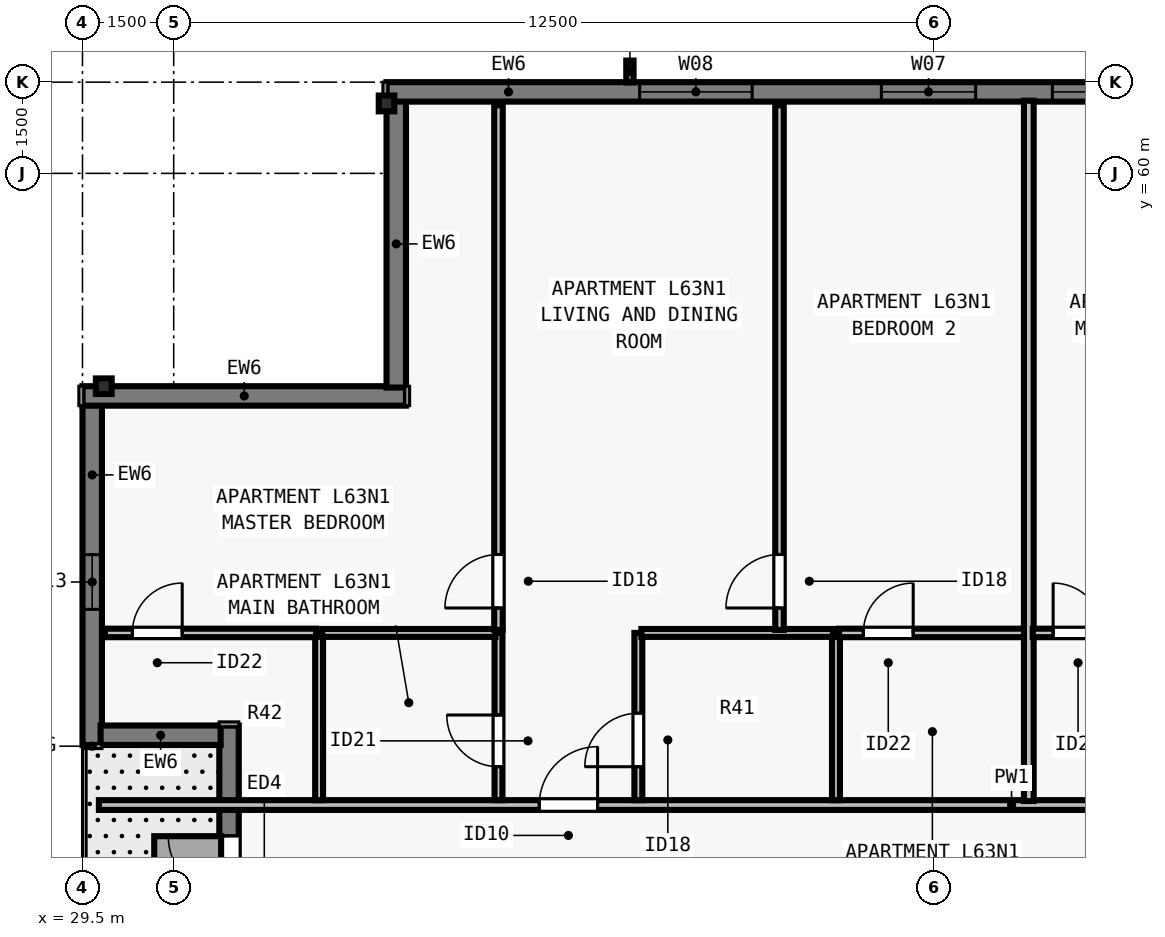
"""IFC4 building model, lengths in metres.
Left out: names, types, materials, properties, quantities, classifications, styles, units other than length and angle.
Written with IfcOpenShell. Run it as: python <this file> out.ifc"""

import sys

from ifc_helpers import new_model, si_unit, direction, frame, frame_2d, origin, origin_2d, place, context, subcontext, project, spatial, rectangle, i_section, extrude, element, fill, save


model = new_model("IFC4")
c1 = context("Model", 3, precision=1e-05, world=origin(), true_north=direction((0.0, 1.0)))
c2 = subcontext(c1, "Body", "Model", "MODEL_VIEW")
j1 = project(units=[si_unit("LENGTHUNIT", "METRE"), si_unit("PLANEANGLEUNIT", "RADIAN")], contexts=[c1])
p1 = place(None, origin())
s1 = spatial("IfcSite", under=j1, at=p1, CompositionType="ELEMENT")
p2 = place(p1, origin())
s2 = spatial("IfcBuilding", under=s1, at=p2, CompositionType="ELEMENT")
p3 = place(p2, frame((0.0, 0.0, 230.5)))
s3 = spatial("IfcBuildingStorey", under=s2, at=p3, CompositionType="ELEMENT", Elevation=230.5)
for number, where, z_axis, x_axis in (
    (1, (34.5, 61.15, 0.0), (0.0, 0.0, 1.0), (1.0, 0.0, 0.0)),
    (2, (29.85, 56.5, 0.0), (0.0, 0.0, 1.0), (0.0, 1.0, 0.0)),
):
    element("IfcColumn", number, at=place(p3, frame(where, z_axis=z_axis, x_axis=x_axis)), inside=s3, PredefinedType="COLUMN", context=c2, shape_type="SweptSolid", body=[
        extrude(i_section(OverallWidth=0.256, OverallDepth=0.26, WebThickness=0.01, FlangeThickness=0.017, FilletRadius=0.013, at=origin_2d()), origin(), (0.0, 0.0, 1.0), 3.5),
    ])
p4 = place(p3, frame((29.66, 50.6, 0.0), z_axis=(0.0, 0.0, 1.0), x_axis=(0.0, 1.0, 0.0)))
e3 = element("IfcWall", 3, at=p4, inside=s3, PredefinedType="SOLIDWALL", context=c2, shape_type="SweptSolid", body=[
    extrude(rectangle(XDim=5.602, YDim=0.32, at=frame_2d((2.801, 0.0))), origin(), (0.0, 0.0, 1.0), 3.29),
])
p5 = place(p4, frame((2.23, 0.0, 0.8)))
e4 = element("IfcOpeningElement", 4, at=p5, cuts=e3, PredefinedType="OPENING", context=c2, shape_type="SweptSolid", body=[
    extrude(rectangle(XDim=0.9, YDim=1.678, at=frame_2d((0.45, 0.839))), frame((0.0, 0.17, 0.0), z_axis=(0.0, -1.0, 0.0), x_axis=(1.0, 0.0, 0.0)), (0.0, 0.0, 1.0), 0.34),
])
p6 = place(p3, frame((29.5, 56.34, 0.0), z_axis=(0.0, 0.0, 1.0), x_axis=(1.0, 0.0, 0.0)))
e5 = element("IfcWall", 5, at=p6, inside=s3, PredefinedType="SOLIDWALL", context=c2, shape_type="SweptSolid", body=[
    extrude(rectangle(XDim=5.32, YDim=0.32, at=frame_2d((2.66, 0.0))), origin(), (0.0, 0.0, 1.0), 3.29),
])
p7 = place(p3, frame((34.66, 56.478, 0.0), z_axis=(0.0, 0.0, 1.0), x_axis=(0.0, 1.0, 0.0)))
e6 = element("IfcWall", 6, at=p7, inside=s3, PredefinedType="SOLIDWALL", context=c2, shape_type="SweptSolid", body=[
    extrude(rectangle(XDim=4.724, YDim=0.32, at=frame_2d((2.362, 0.0))), origin(), (0.0, 0.0, 1.0), 3.29),
])
p8 = place(p3, frame((34.5, 61.34, 0.0), z_axis=(0.0, 0.0, 1.0), x_axis=(1.0, 0.0, 0.0)))
e7 = element("IfcWall", 7, at=p8, inside=s3, PredefinedType="SOLIDWALL", context=c2, shape_type="SweptSolid", body=[
    extrude(rectangle(XDim=34.702, YDim=0.32, at=frame_2d((17.351, 0.0))), origin(), (0.0, 0.0, 1.0), 3.29),
])
p9 = place(p8, frame((4.163, 0.0, 0.8)))
e8 = element("IfcOpeningElement", 8, at=p9, cuts=e7, PredefinedType="OPENING", context=c2, shape_type="SweptSolid", body=[
    extrude(rectangle(XDim=1.85, YDim=1.678, at=frame_2d((0.925, 0.839))), frame((0.0, 0.17, 0.0), z_axis=(0.0, -1.0, 0.0), x_axis=(1.0, 0.0, 0.0)), (0.0, 0.0, 1.0), 0.34),
])
p10 = place(p8, frame((8.138, 0.0, 0.8)))
e9 = element("IfcOpeningElement", 9, at=p10, cuts=e7, PredefinedType="OPENING", context=c2, shape_type="SweptSolid", body=[
    extrude(rectangle(XDim=1.55, YDim=1.678, at=frame_2d((0.775, 0.839))), frame((0.0, 0.17, 0.0), z_axis=(0.0, -1.0, 0.0), x_axis=(1.0, 0.0, 0.0)), (0.0, 0.0, 1.0), 0.34),
])
p11 = place(p8, frame((15.338, 0.0, 0.8)))
e10 = element("IfcOpeningElement", 10, at=p11, cuts=e7, PredefinedType="OPENING", context=c2, shape_type="SweptSolid", body=[
    extrude(rectangle(XDim=1.55, YDim=1.678, at=frame_2d((0.775, 0.839))), frame((0.0, 0.17, 0.0), z_axis=(0.0, -1.0, 0.0), x_axis=(1.0, 0.0, 0.0)), (0.0, 0.0, 1.0), 0.34),
])
p12 = place(p8, frame((18.114, 0.0, 0.8)))
e11 = element("IfcOpeningElement", 11, at=p12, cuts=e7, PredefinedType="OPENING", context=c2, shape_type="SweptSolid", body=[
    extrude(rectangle(XDim=1.85, YDim=1.678, at=frame_2d((0.925, 0.839))), frame((0.0, 0.17, 0.0), z_axis=(0.0, -1.0, 0.0), x_axis=(1.0, 0.0, 0.0)), (0.0, 0.0, 1.0), 0.34),
])
p13 = place(p8, frame((25.314, 0.0, 0.8)))
e12 = element("IfcOpeningElement", 12, at=p13, cuts=e7, PredefinedType="OPENING", context=c2, shape_type="SweptSolid", body=[
    extrude(rectangle(XDim=1.85, YDim=1.678, at=frame_2d((0.925, 0.839))), frame((0.0, 0.17, 0.0), z_axis=(0.0, -1.0, 0.0), x_axis=(1.0, 0.0, 0.0)), (0.0, 0.0, 1.0), 0.34),
])
p14 = place(p8, frame((29.24, 0.0, 0.8)))
e13 = element("IfcOpeningElement", 13, at=p14, cuts=e7, PredefinedType="OPENING", context=c2, shape_type="SweptSolid", body=[
    extrude(rectangle(XDim=1.55, YDim=1.678, at=frame_2d((0.775, 0.839))), frame((0.0, 0.17, 0.0), z_axis=(0.0, -1.0, 0.0), x_axis=(1.0, 0.0, 0.0)), (0.0, 0.0, 1.0), 0.34),
])
p15 = place(p8, frame((10.95, 0.0, 0.8)))
e14 = element("IfcOpeningElement", 14, at=p15, cuts=e7, PredefinedType="OPENING", context=c2, shape_type="SweptSolid", body=[
    extrude(rectangle(XDim=0.9, YDim=1.678, at=frame_2d((0.45, 0.839))), frame((0.0, 0.17, 0.0), z_axis=(0.0, -1.0, 0.0), x_axis=(1.0, 0.0, 0.0)), (0.0, 0.0, 1.0), 0.34),
])
p16 = place(p8, frame((22.87, 0.0, 0.8)))
e15 = element("IfcOpeningElement", 15, at=p16, cuts=e7, PredefinedType="OPENING", context=c2, shape_type="SweptSolid", body=[
    extrude(rectangle(XDim=0.9, YDim=1.678, at=frame_2d((0.45, 0.839))), frame((0.0, 0.17, 0.0), z_axis=(0.0, -1.0, 0.0), x_axis=(1.0, 0.0, 0.0)), (0.0, 0.0, 1.0), 0.34),
])
p17 = place(p3, frame((31.91, 45.178, 0.0), z_axis=(0.0, 0.0, 1.0), x_axis=(0.0, 1.0, 0.0)))
e16 = element("IfcWall", 16, at=p17, inside=s3, PredefinedType="SOLIDWALL", context=c2, shape_type="SweptSolid", body=[
    extrude(rectangle(XDim=5.742, YDim=0.32, at=frame_2d((2.871, 0.0))), origin(), (0.0, 0.0, 1.0), 3.29),
])
p18 = place(p17, frame((2.928, 0.0, 0.0)))
e17 = element("IfcOpeningElement", 17, at=p18, cuts=e16, PredefinedType="OPENING", context=c2, shape_type="SweptSolid", body=[
    extrude(rectangle(XDim=1.0, YDim=2.15, at=frame_2d((0.5, 1.075))), frame((0.0, 0.17, 0.0), z_axis=(0.0, -1.0, 0.0), x_axis=(1.0, 0.0, 0.0)), (0.0, 0.0, 1.0), 0.34),
])
p19 = place(p3, frame((31.772, 50.76, 0.0), z_axis=(0.0, 0.0, 1.0), x_axis=(-1.0, 0.0, 0.0)))
e18 = element("IfcWall", 18, at=p19, inside=s3, PredefinedType="SOLIDWALL", context=c2, shape_type="SweptSolid", body=[
    extrude(rectangle(XDim=1.974, YDim=0.32, at=frame_2d((0.987, 0.0))), origin(), (0.0, 0.0, 1.0), 3.29),
])
p20 = place(p3, frame((29.77, 49.613, 0.0), z_axis=(0.0, 0.0, 1.0), x_axis=(1.0, 0.0, 0.0)))
e19 = element("IfcWall", 19, at=p20, inside=s3, PredefinedType="PARTITIONING", context=c2, shape_type="SweptSolid", body=[
    extrude(rectangle(XDim=44.425, YDim=0.16, at=frame_2d((22.212, 0.0))), origin(), (0.0, 0.0, 1.0), 2.958),
])
p21 = place(p20, frame((7.241, 0.0, 0.0)))
e20 = element("IfcOpeningElement", 20, at=p21, cuts=e19, PredefinedType="OPENING", context=c2, shape_type="SweptSolid", body=[
    extrude(rectangle(XDim=0.96, YDim=2.18, at=frame_2d((0.48, 1.09))), frame((0.0, 0.09, 0.0), z_axis=(0.0, -1.0, 0.0), x_axis=(1.0, 0.0, 0.0)), (0.0, 0.0, 1.0), 0.18),
])
p22 = place(p20, frame((21.815, 0.0, 0.0)))
e21 = element("IfcOpeningElement", 21, at=p22, cuts=e19, PredefinedType="OPENING", context=c2, shape_type="SweptSolid", body=[
    extrude(rectangle(XDim=0.96, YDim=2.18, at=frame_2d((0.48, 1.09))), frame((0.0, 0.09, 0.0), z_axis=(0.0, -1.0, 0.0), x_axis=(1.0, 0.0, 0.0)), (0.0, 0.0, 1.0), 0.18),
])
p23 = place(p20, frame((36.324, 0.0, 0.0)))
e22 = element("IfcOpeningElement", 22, at=p23, cuts=e19, PredefinedType="OPENING", context=c2, shape_type="SweptSolid", body=[
    extrude(rectangle(XDim=0.96, YDim=2.18, at=frame_2d((0.48, 1.09))), frame((0.0, 0.09, 0.0), z_axis=(0.0, -1.0, 0.0), x_axis=(1.0, 0.0, 0.0)), (0.0, 0.0, 1.0), 0.18),
])
p24 = place(p3, frame((33.391, 49.692, 0.0), z_axis=(0.0, 0.0, 1.0), x_axis=(0.0, 1.0, 0.0)))
e23 = element("IfcWall", 23, at=p24, inside=s3, PredefinedType="PLUMBINGWALL", context=c2, shape_type="SweptSolid", body=[
    extrude(rectangle(XDim=2.75, YDim=0.13, at=frame_2d((1.375, 0.0))), origin(), (0.0, 0.0, 1.0), 3.29),
])
p25 = place(p3, frame((36.341, 49.692, 0.0), z_axis=(0.0, 0.0, 1.0), x_axis=(0.0, 1.0, 0.0)))
e24 = element("IfcWall", 24, at=p25, inside=s3, PredefinedType="PLUMBINGWALL", context=c2, shape_type="SweptSolid", body=[
    extrude(rectangle(XDim=2.75, YDim=0.13, at=frame_2d((1.375, 0.0))), origin(), (0.0, 0.0, 1.0), 3.29),
])
p26 = place(p25, frame((0.55, 0.0, 0.0)))
e25 = element("IfcOpeningElement", 25, at=p26, cuts=e24, PredefinedType="OPENING", context=c2, shape_type="SweptSolid", body=[
    extrude(rectangle(XDim=0.85, YDim=2.08, at=frame_2d((0.425, 1.04))), frame((0.0, 0.075, 0.0), z_axis=(0.0, -1.0, 0.0), x_axis=(1.0, 0.0, 0.0)), (0.0, 0.0, 1.0), 0.15),
])
p27 = place(p3, frame((33.441, 52.442, 0.0), z_axis=(0.0, 0.0, 1.0), x_axis=(1.0, 0.0, 0.0)))
e26 = element("IfcWall", 26, at=p27, inside=s3, PredefinedType="PLUMBINGWALL", context=c2, shape_type="SweptSolid", body=[
    extrude(rectangle(XDim=2.85, YDim=0.13, at=frame_2d((1.425, 0.0))), origin(), (0.0, 0.0, 1.0), 2.958),
])
p28 = place(p3, frame((41.891, 49.692, 0.0), z_axis=(0.0, 0.0, 1.0), x_axis=(0.0, 1.0, 0.0)))
e27 = element("IfcWall", 27, at=p28, inside=s3, PredefinedType="PLUMBINGWALL", context=c2, shape_type="SweptSolid", body=[
    extrude(rectangle(XDim=2.75, YDim=0.13, at=frame_2d((1.375, 0.0))), origin(), (0.0, 0.0, 1.0), 2.573),
])
p29 = place(p3, frame((38.641, 49.692, 0.0), z_axis=(0.0, 0.0, 1.0), x_axis=(0.0, 1.0, 0.0)))
e28 = element("IfcWall", 28, at=p29, inside=s3, PredefinedType="PLUMBINGWALL", context=c2, shape_type="SweptSolid", body=[
    extrude(rectangle(XDim=2.75, YDim=0.13, at=frame_2d((1.375, 0.0))), origin(), (0.0, 0.0, 1.0), 3.29),
])
p30 = place(p29, frame((0.55, 0.0, 0.0)))
e29 = element("IfcOpeningElement", 29, at=p30, cuts=e28, PredefinedType="OPENING", context=c2, shape_type="SweptSolid", body=[
    extrude(rectangle(XDim=0.88, YDim=2.1, at=frame_2d((0.44, 1.05))), frame((0.0, 0.075, 0.0), z_axis=(0.0, -1.0, 0.0), x_axis=(1.0, 0.0, 0.0)), (0.0, 0.0, 1.0), 0.15),
])
p31 = place(p3, frame((38.691, 52.442, 0.0), z_axis=(0.0, 0.0, 1.0), x_axis=(1.0, 0.0, 0.0)))
e30 = element("IfcWall", 30, at=p31, inside=s3, PredefinedType="PLUMBINGWALL", context=c2, shape_type="SweptSolid", body=[
    extrude(rectangle(XDim=3.15, YDim=0.13, at=frame_2d((1.575, 0.0))), origin(), (0.0, 0.0, 1.0), 3.29),
])
p32 = place(p3, frame((36.341, 52.492, 0.0), z_axis=(0.0, 0.0, 1.0), x_axis=(0.0, 1.0, 0.0)))
e31 = element("IfcWall", 31, at=p32, inside=s3, PredefinedType="PARTITIONING", context=c2, shape_type="SweptSolid", body=[
    extrude(rectangle(XDim=8.628, YDim=0.14, at=frame_2d((4.314, 0.0))), origin(), (0.0, 0.0, 1.0), 2.573),
])
p33 = place(p32, frame((0.36, 0.0, 0.0)))
e32 = element("IfcOpeningElement", 32, at=p33, cuts=e31, PredefinedType="OPENING", context=c2, shape_type="SweptSolid", body=[
    extrude(rectangle(XDim=0.88, YDim=2.1, at=frame_2d((0.44, 1.05))), frame((0.0, 0.08, 0.0), z_axis=(0.0, -1.0, 0.0), x_axis=(1.0, 0.0, 0.0)), (0.0, 0.0, 1.0), 0.16),
])
p34 = place(p3, frame((29.87, 52.442, 0.0), z_axis=(0.0, 0.0, 1.0), x_axis=(1.0, 0.0, 0.0)))
e33 = element("IfcWall", 33, at=p34, inside=s3, PredefinedType="PARTITIONING", context=c2, shape_type="SweptSolid", body=[
    extrude(rectangle(XDim=3.471, YDim=0.14, at=frame_2d((1.736, 0.0))), origin(), (0.0, 0.0, 1.0), 3.29),
])
p35 = place(p34, frame((0.45, 0.0, 0.0)))
e34 = element("IfcOpeningElement", 34, at=p35, cuts=e33, PredefinedType="OPENING", context=c2, shape_type="SweptSolid", body=[
    extrude(rectangle(XDim=0.82, YDim=2.1, at=frame_2d((0.41, 1.05))), frame((0.0, 0.08, 0.0), z_axis=(0.0, -1.0, 0.0), x_axis=(1.0, 0.0, 0.0)), (0.0, 0.0, 1.0), 0.16),
])
p36 = place(p3, frame((40.962, 52.492, 0.0), z_axis=(0.0, 0.0, 1.0), x_axis=(0.0, 1.0, 0.0)))
e35 = element("IfcWall", 35, at=p36, inside=s3, PredefinedType="PARTITIONING", context=c2, shape_type="SweptSolid", body=[
    extrude(rectangle(XDim=8.628, YDim=0.14, at=frame_2d((4.314, 0.0))), origin(), (0.0, 0.0, 1.0), 3.29),
])
p37 = place(p36, frame((0.36, 0.0, 0.0)))
e36 = element("IfcOpeningElement", 36, at=p37, cuts=e35, PredefinedType="OPENING", context=c2, shape_type="SweptSolid", body=[
    extrude(rectangle(XDim=0.88, YDim=2.1, at=frame_2d((0.44, 1.05))), frame((0.0, 0.08, 0.0), z_axis=(0.0, -1.0, 0.0), x_axis=(1.0, 0.0, 0.0)), (0.0, 0.0, 1.0), 0.16),
])
p38 = place(p3, frame((41.941, 52.442, 0.0), z_axis=(0.0, 0.0, 1.0), x_axis=(1.0, 0.0, 0.0)))
e37 = element("IfcWall", 37, at=p38, inside=s3, PredefinedType="PARTITIONING", context=c2, shape_type="SweptSolid", body=[
    extrude(rectangle(XDim=3.171, YDim=0.14, at=frame_2d((1.586, 0.0))), origin(), (0.0, 0.0, 1.0), 3.29),
])
p39 = place(p38, frame((0.4, 0.0, 0.0)))
e38 = element("IfcOpeningElement", 38, at=p39, cuts=e37, PredefinedType="OPENING", context=c2, shape_type="SweptSolid", body=[
    extrude(rectangle(XDim=0.82, YDim=2.1, at=frame_2d((0.41, 1.05))), frame((0.0, 0.08, 0.0), z_axis=(0.0, -1.0, 0.0), x_axis=(1.0, 0.0, 0.0)), (0.0, 0.0, 1.0), 0.16),
])
p40 = place(p3, frame((45.062, 49.677, 0.0), z_axis=(0.0, 0.0, 1.0), x_axis=(0.0, 1.0, 0.0)))
e39 = element("IfcWall", 39, at=p40, inside=s3, PredefinedType="PARTITIONING", context=c2, shape_type="SweptSolid", body=[
    extrude(rectangle(XDim=11.518, YDim=0.16, at=frame_2d((5.759, 0.0))), origin(), (0.0, 0.0, 1.0), 3.29),
])
p41 = place(p3, frame((45.127, 52.442, 0.0), z_axis=(0.0, 0.0, 1.0), x_axis=(1.0, 0.0, 0.0)))
e40 = element("IfcWall", 40, at=p41, inside=s3, PredefinedType="PARTITIONING", context=c2, shape_type="SweptSolid", body=[
    extrude(rectangle(XDim=2.788, YDim=0.14, at=frame_2d((1.394, 0.0))), origin(), (0.0, 0.0, 1.0), 3.29),
])
p42 = place(p41, frame((0.335, 0.0, 0.0)))
e41 = element("IfcOpeningElement", 41, at=p42, cuts=e40, PredefinedType="OPENING", context=c2, shape_type="SweptSolid", body=[
    extrude(rectangle(XDim=0.82, YDim=2.1, at=frame_2d((0.41, 1.05))), frame((0.0, 0.08, 0.0), z_axis=(0.0, -1.0, 0.0), x_axis=(1.0, 0.0, 0.0)), (0.0, 0.0, 1.0), 0.16),
])
p43 = place(p9, origin())
e42 = element("IfcWindow", 42, at=p43, inside=s3, PartitioningType="SINGLE_PANEL", PredefinedType="WINDOW", context=c2, shape_type="SweptSolid", body=[
    extrude(rectangle(XDim=1.85, YDim=1.678, at=frame_2d((0.925, 0.839))), frame((0.0, -0.05, 0.0), z_axis=(0.0, -1.0, 0.0), x_axis=(1.0, 0.0, 0.0)), (0.0, 0.0, 1.0), 0.06),
])
fill(e8, e42)
p44 = place(p10, origin())
e43 = element("IfcWindow", 43, at=p44, inside=s3, PartitioningType="SINGLE_PANEL", PredefinedType="WINDOW", context=c2, shape_type="SweptSolid", body=[
    extrude(rectangle(XDim=1.55, YDim=1.678, at=frame_2d((0.775, 0.839))), frame((0.0, -0.05, 0.0), z_axis=(0.0, -1.0, 0.0), x_axis=(1.0, 0.0, 0.0)), (0.0, 0.0, 1.0), 0.06),
])
fill(e9, e43)
p45 = place(p18, origin())
e44 = element("IfcDoor", 44, at=p45, inside=s3, OperationType="SINGLE_SWING_RIGHT", PredefinedType="DOOR", context=c2, shape_type="SweptSolid", body=[
    extrude(rectangle(XDim=1.0, YDim=2.15, at=frame_2d((0.5, 1.075))), frame((0.0, 0.025, 0.0), z_axis=(0.0, -1.0, 0.0), x_axis=(1.0, 0.0, 0.0)), (0.0, 0.0, 1.0), 0.05),
])
fill(e17, e44)
p46 = place(p5, origin())
e45 = element("IfcWindow", 45, at=p46, inside=s3, PartitioningType="SINGLE_PANEL", PredefinedType="WINDOW", context=c2, shape_type="SweptSolid", body=[
    extrude(rectangle(XDim=0.9, YDim=1.678, at=frame_2d((0.45, 0.839))), frame((0.0, -0.04, 0.0), z_axis=(0.0, -1.0, 0.0), x_axis=(1.0, 0.0, 0.0)), (0.0, 0.0, 1.0), 0.06),
])
fill(e4, e45)
p47 = place(p15, origin())
e46 = element("IfcWindow", 46, at=p47, inside=s3, PartitioningType="SINGLE_PANEL", PredefinedType="WINDOW", context=c2, shape_type="SweptSolid", body=[
    extrude(rectangle(XDim=0.9, YDim=1.678, at=frame_2d((0.45, 0.839))), frame((0.0, -0.04, 0.0), z_axis=(0.0, -1.0, 0.0), x_axis=(1.0, 0.0, 0.0)), (0.0, 0.0, 1.0), 0.06),
])
fill(e14, e46)
p48 = place(p26, origin())
e47 = element("IfcDoor", 47, at=p48, inside=s3, OperationType="SINGLE_SWING_RIGHT", PredefinedType="DOOR", context=c2, shape_type="SweptSolid", body=[
    extrude(rectangle(XDim=0.85, YDim=2.08, at=frame_2d((0.425, 1.04))), frame((0.0, 0.025, 0.0), z_axis=(0.0, -1.0, 0.0), x_axis=(1.0, 0.0, 0.0)), (0.0, 0.0, 1.0), 0.05),
])
fill(e25, e47)
p49 = place(p30, origin())
e48 = element("IfcDoor", 48, at=p49, inside=s3, OperationType="SINGLE_SWING_LEFT", PredefinedType="DOOR", context=c2, shape_type="SweptSolid", body=[
    extrude(rectangle(XDim=0.88, YDim=2.1, at=frame_2d((0.44, 1.05))), frame((0.0, 0.025, 0.0), z_axis=(0.0, -1.0, 0.0), x_axis=(1.0, 0.0, 0.0)), (0.0, 0.0, 1.0), 0.05),
])
fill(e29, e48)
p50 = place(p35, origin())
e49 = element("IfcDoor", 49, at=p50, inside=s3, OperationType="SINGLE_SWING_RIGHT", PredefinedType="DOOR", context=c2, shape_type="SweptSolid", body=[
    extrude(rectangle(XDim=0.82, YDim=2.1, at=frame_2d((0.41, 1.05))), frame((0.0, 0.025, 0.0), z_axis=(0.0, -1.0, 0.0), x_axis=(1.0, 0.0, 0.0)), (0.0, 0.0, 1.0), 0.05),
])
fill(e34, e49)
p51 = place(p33, origin())
e50 = element("IfcDoor", 50, at=p51, inside=s3, OperationType="SINGLE_SWING_LEFT", PredefinedType="DOOR", context=c2, shape_type="SweptSolid", body=[
    extrude(rectangle(XDim=0.88, YDim=2.1, at=frame_2d((0.44, 1.05))), frame((0.0, 0.025, 0.0), z_axis=(0.0, -1.0, 0.0), x_axis=(1.0, 0.0, 0.0)), (0.0, 0.0, 1.0), 0.05),
])
fill(e32, e50)
p52 = place(p39, origin())
e51 = element("IfcDoor", 51, at=p52, inside=s3, OperationType="SINGLE_SWING_RIGHT", PredefinedType="DOOR", context=c2, shape_type="SweptSolid", body=[
    extrude(rectangle(XDim=0.82, YDim=2.1, at=frame_2d((0.41, 1.05))), frame((0.0, 0.025, 0.0), z_axis=(0.0, -1.0, 0.0), x_axis=(1.0, 0.0, 0.0)), (0.0, 0.0, 1.0), 0.05),
])
fill(e38, e51)
p53 = place(p37, origin())
e52 = element("IfcDoor", 52, at=p53, inside=s3, OperationType="SINGLE_SWING_LEFT", PredefinedType="DOOR", context=c2, shape_type="SweptSolid", body=[
    extrude(rectangle(XDim=0.88, YDim=2.1, at=frame_2d((0.44, 1.05))), frame((0.0, 0.025, 0.0), z_axis=(0.0, -1.0, 0.0), x_axis=(1.0, 0.0, 0.0)), (0.0, 0.0, 1.0), 0.05),
])
fill(e36, e52)
p54 = place(p21, origin())
e53 = element("IfcDoor", 53, at=p54, inside=s3, OperationType="SINGLE_SWING_RIGHT", PredefinedType="DOOR", context=c2, shape_type="SweptSolid", body=[
    extrude(rectangle(XDim=0.96, YDim=2.18, at=frame_2d((0.48, 1.09))), frame((0.0, 0.025, 0.0), z_axis=(0.0, -1.0, 0.0), x_axis=(1.0, 0.0, 0.0)), (0.0, 0.0, 1.0), 0.05),
])
fill(e20, e53)
p55 = place(p42, origin())
e54 = element("IfcDoor", 54, at=p55, inside=s3, OperationType="SINGLE_SWING_LEFT", PredefinedType="DOOR", context=c2, shape_type="SweptSolid", body=[
    extrude(rectangle(XDim=0.82, YDim=2.1, at=frame_2d((0.41, 1.05))), frame((0.0, 0.025, 0.0), z_axis=(0.0, -1.0, 0.0), x_axis=(1.0, 0.0, 0.0)), (0.0, 0.0, 1.0), 0.05),
])
fill(e41, e54)
save(model, sys.argv[1])
